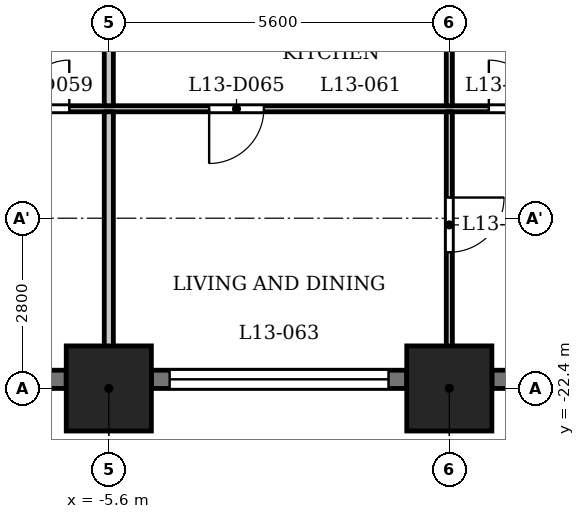
"""IFC4 building model, lengths in metres.
Left out: names, types, materials, properties, quantities, classifications, styles, units other than length and angle.
Written with IfcOpenShell. Run it as: python <this file> out.ifc"""

import sys

from ifc_helpers import new_model, si_unit, direction, frame, frame_2d, origin, origin_2d, place, context, subcontext, project, spatial, rectangle, extrude, element, fill, save


model = new_model("IFC4")
c1 = context("Model", 3, precision=1e-05, world=origin(), true_north=direction((0.0, 1.0)))
c2 = subcontext(c1, "Body", "Model", "MODEL_VIEW")
j1 = project(units=[si_unit("LENGTHUNIT", "METRE"), si_unit("PLANEANGLEUNIT", "RADIAN")], contexts=[c1])
p1 = place(None, origin())
s1 = spatial("IfcSite", under=j1, at=p1, CompositionType="ELEMENT")
p2 = place(p1, origin())
s2 = spatial("IfcBuilding", under=s1, at=p2, CompositionType="ELEMENT")
p3 = place(p2, frame((0.0, 0.0, 55.0)))
s3 = spatial("IfcBuildingStorey", under=s2, at=p3, CompositionType="ELEMENT", Elevation=55.0)
for number, where, z_axis, x_axis in (
    (1, (-5.6, -22.4, 0.0), (0.0, 0.0, 1.0), (1.0, 0.0, 0.0)),
    (2, (0.0, -22.4, 0.0), (0.0, 0.0, 1.0), (1.0, 0.0, 0.0)),
):
    element("IfcColumn", number, at=place(p3, frame(where, z_axis=z_axis, x_axis=x_axis)), inside=s3, PredefinedType="COLUMN", context=c2, shape_type="SweptSolid", body=[
        extrude(rectangle(XDim=1.4, YDim=1.4, at=origin_2d()), origin(), (0.0, 0.0, 1.0), 3.5),
    ])
p4 = place(p3, frame((-10.5, -22.25, 0.0), z_axis=(0.0, 0.0, 1.0), x_axis=(1.0, 0.0, 0.0)))
e3 = element("IfcWall", 3, at=p4, inside=s3, PredefinedType="SOLIDWALL", context=c2, shape_type="SweptSolid", body=[
    extrude(rectangle(XDim=4.2, YDim=0.3, at=frame_2d((2.1, 0.0))), origin(), (0.0, 0.0, 1.0), 2.35),
])
p5 = place(p4, frame((0.3, 0.0, 1.2)))
e4 = element("IfcOpeningElement", 4, at=p5, cuts=e3, PredefinedType="OPENING", context=c2, shape_type="SweptSolid", body=[
    extrude(rectangle(XDim=3.6, YDim=0.95, at=frame_2d((1.8, 0.475))), frame((0.0, 0.16, 0.0), z_axis=(0.0, -1.0, 0.0), x_axis=(1.0, 0.0, 0.0)), (0.0, 0.0, 1.0), 0.32),
])
p6 = place(p3, frame((-4.9, -22.25, 0.0), z_axis=(0.0, 0.0, 1.0), x_axis=(1.0, 0.0, 0.0)))
e5 = element("IfcWall", 5, at=p6, inside=s3, PredefinedType="SOLIDWALL", context=c2, shape_type="SweptSolid", body=[
    extrude(rectangle(XDim=4.2, YDim=0.3, at=frame_2d((2.1, 0.0))), origin(), (0.0, 0.0, 1.0), 2.35),
])
p7 = place(p6, frame((0.3, 0.0, 1.2)))
e6 = element("IfcOpeningElement", 6, at=p7, cuts=e5, PredefinedType="OPENING", context=c2, shape_type="SweptSolid", body=[
    extrude(rectangle(XDim=3.6, YDim=0.95, at=frame_2d((1.8, 0.475))), frame((0.0, 0.16, 0.0), z_axis=(0.0, -1.0, 0.0), x_axis=(1.0, 0.0, 0.0)), (0.0, 0.0, 1.0), 0.32),
])
p8 = place(p3, frame((0.7, -22.25, 0.0), z_axis=(0.0, 0.0, 1.0), x_axis=(1.0, 0.0, 0.0)))
e7 = element("IfcWall", 7, at=p8, inside=s3, PredefinedType="SOLIDWALL", context=c2, shape_type="SweptSolid", body=[
    extrude(rectangle(XDim=4.2, YDim=0.3, at=frame_2d((2.1, 0.0))), origin(), (0.0, 0.0, 1.0), 2.35),
])
p9 = place(p8, frame((0.3, 0.0, 1.2)))
e8 = element("IfcOpeningElement", 8, at=p9, cuts=e7, PredefinedType="OPENING", context=c2, shape_type="SweptSolid", body=[
    extrude(rectangle(XDim=3.6, YDim=0.95, at=frame_2d((1.8, 0.475))), frame((0.0, 0.16, 0.0), z_axis=(0.0, -1.0, 0.0), x_axis=(1.0, 0.0, 0.0)), (0.0, 0.0, 1.0), 0.32),
])
p10 = place(p3, frame((-26.394, -17.8, 0.0), z_axis=(0.0, 0.0, 1.0), x_axis=(1.0, 0.0, 0.0)))
e9 = element("IfcWall", 9, at=p10, inside=s3, PredefinedType="PARTITIONING", context=c2, shape_type="SweptSolid", body=[
    extrude(rectangle(XDim=53.034, YDim=0.1, at=frame_2d((26.517, 0.0))), origin(), (0.0, 0.0, 1.0), 3.2),
])
p11 = place(p10, frame((0.794, 0.0, 0.0)))
e10 = element("IfcOpeningElement", 10, at=p11, cuts=e9, PredefinedType="OPENING", context=c2, shape_type="SweptSolid", body=[
    extrude(rectangle(XDim=0.8, YDim=2.1, at=frame_2d((0.4, 1.05))), frame((0.0, 0.06, 0.0), z_axis=(0.0, -1.0, 0.0), x_axis=(1.0, 0.0, 0.0)), (0.0, 0.0, 1.0), 0.12),
])
p12 = place(p10, frame((5.644, 0.0, 0.0)))
e11 = element("IfcOpeningElement", 11, at=p12, cuts=e9, PredefinedType="OPENING", context=c2, shape_type="SweptSolid", body=[
    extrude(rectangle(XDim=0.9, YDim=2.1, at=frame_2d((0.45, 1.05))), frame((0.0, 0.06, 0.0), z_axis=(0.0, -1.0, 0.0), x_axis=(1.0, 0.0, 0.0)), (0.0, 0.0, 1.0), 0.12),
])
p13 = place(p10, frame((19.344, 0.0, 0.0)))
e12 = element("IfcOpeningElement", 12, at=p13, cuts=e9, PredefinedType="OPENING", context=c2, shape_type="SweptSolid", body=[
    extrude(rectangle(XDim=0.8, YDim=2.1, at=frame_2d((0.4, 1.05))), frame((0.0, 0.06, 0.0), z_axis=(0.0, -1.0, 0.0), x_axis=(1.0, 0.0, 0.0)), (0.0, 0.0, 1.0), 0.12),
])
p14 = place(p10, frame((17.094, 0.0, 0.0)))
e13 = element("IfcOpeningElement", 13, at=p14, cuts=e9, PredefinedType="OPENING", context=c2, shape_type="SweptSolid", body=[
    extrude(rectangle(XDim=0.9, YDim=2.1, at=frame_2d((0.45, 1.05))), frame((0.0, 0.06, 0.0), z_axis=(0.0, -1.0, 0.0), x_axis=(1.0, 0.0, 0.0)), (0.0, 0.0, 1.0), 0.12),
])
p15 = place(p10, frame((10.494, 0.0, 0.0)))
e14 = element("IfcOpeningElement", 14, at=p15, cuts=e9, PredefinedType="OPENING", context=c2, shape_type="SweptSolid", body=[
    extrude(rectangle(XDim=0.9, YDim=2.1, at=frame_2d((0.45, 1.05))), frame((0.0, 0.06, 0.0), z_axis=(0.0, -1.0, 0.0), x_axis=(1.0, 0.0, 0.0)), (0.0, 0.0, 1.0), 0.12),
])
p16 = place(p10, frame((13.294, 0.0, 0.0)))
e15 = element("IfcOpeningElement", 15, at=p16, cuts=e9, PredefinedType="OPENING", context=c2, shape_type="SweptSolid", body=[
    extrude(rectangle(XDim=0.9, YDim=2.1, at=frame_2d((0.45, 1.05))), frame((0.0, 0.06, 0.0), z_axis=(0.0, -1.0, 0.0), x_axis=(1.0, 0.0, 0.0)), (0.0, 0.0, 1.0), 0.12),
])
p17 = place(p10, frame((27.044, 0.0, 0.0)))
e16 = element("IfcOpeningElement", 16, at=p17, cuts=e9, PredefinedType="OPENING", context=c2, shape_type="SweptSolid", body=[
    extrude(rectangle(XDim=0.8, YDim=2.1, at=frame_2d((0.4, 1.05))), frame((0.0, 0.06, 0.0), z_axis=(0.0, -1.0, 0.0), x_axis=(1.0, 0.0, 0.0)), (0.0, 0.0, 1.0), 0.12),
])
p18 = place(p10, frame((22.444, 0.0, 0.0)))
e17 = element("IfcOpeningElement", 17, at=p18, cuts=e9, PredefinedType="OPENING", context=c2, shape_type="SweptSolid", body=[
    extrude(rectangle(XDim=0.9, YDim=2.1, at=frame_2d((0.45, 1.05))), frame((0.0, 0.06, 0.0), z_axis=(0.0, -1.0, 0.0), x_axis=(1.0, 0.0, 0.0)), (0.0, 0.0, 1.0), 0.12),
])
p19 = place(p10, frame((36.144, 0.0, 0.0)))
e18 = element("IfcOpeningElement", 18, at=p19, cuts=e9, PredefinedType="OPENING", context=c2, shape_type="SweptSolid", body=[
    extrude(rectangle(XDim=0.8, YDim=2.1, at=frame_2d((0.4, 1.05))), frame((0.0, 0.06, 0.0), z_axis=(0.0, -1.0, 0.0), x_axis=(1.0, 0.0, 0.0)), (0.0, 0.0, 1.0), 0.12),
])
p20 = place(p10, frame((33.644, 0.0, 0.0)))
e19 = element("IfcOpeningElement", 19, at=p20, cuts=e9, PredefinedType="OPENING", context=c2, shape_type="SweptSolid", body=[
    extrude(rectangle(XDim=0.9, YDim=2.1, at=frame_2d((0.45, 1.05))), frame((0.0, 0.06, 0.0), z_axis=(0.0, -1.0, 0.0), x_axis=(1.0, 0.0, 0.0)), (0.0, 0.0, 1.0), 0.12),
])
p21 = place(p10, frame((39.144, 0.0, 0.0)))
e20 = element("IfcOpeningElement", 20, at=p21, cuts=e9, PredefinedType="OPENING", context=c2, shape_type="SweptSolid", body=[
    extrude(rectangle(XDim=0.8, YDim=2.1, at=frame_2d((0.4, 1.05))), frame((0.0, 0.06, 0.0), z_axis=(0.0, -1.0, 0.0), x_axis=(1.0, 0.0, 0.0)), (0.0, 0.0, 1.0), 0.12),
])
p22 = place(p10, frame((41.494, 0.0, 0.0)))
e21 = element("IfcOpeningElement", 21, at=p22, cuts=e9, PredefinedType="OPENING", context=c2, shape_type="SweptSolid", body=[
    extrude(rectangle(XDim=0.9, YDim=2.1, at=frame_2d((0.45, 1.05))), frame((0.0, 0.06, 0.0), z_axis=(0.0, -1.0, 0.0), x_axis=(1.0, 0.0, 0.0)), (0.0, 0.0, 1.0), 0.12),
])
p23 = place(p10, frame((49.362, 0.0, 0.0)))
e22 = element("IfcOpeningElement", 22, at=p23, cuts=e9, PredefinedType="OPENING", context=c2, shape_type="SweptSolid", body=[
    extrude(rectangle(XDim=0.8, YDim=2.1, at=frame_2d((0.4, 1.05))), frame((0.0, 0.06, 0.0), z_axis=(0.0, -1.0, 0.0), x_axis=(1.0, 0.0, 0.0)), (0.0, 0.0, 1.0), 0.12),
])
p24 = place(p10, frame((45.094, 0.0, 0.0)))
e23 = element("IfcOpeningElement", 23, at=p24, cuts=e9, PredefinedType="OPENING", context=c2, shape_type="SweptSolid", body=[
    extrude(rectangle(XDim=0.9, YDim=2.1, at=frame_2d((0.45, 1.05))), frame((0.0, 0.06, 0.0), z_axis=(0.0, -1.0, 0.0), x_axis=(1.0, 0.0, 0.0)), (0.0, 0.0, 1.0), 0.12),
])
p25 = place(p3, frame((-5.6, -23.08, 0.0), z_axis=(0.0, 0.0, 1.0), x_axis=(0.0, 1.0, 0.0)))
e24 = element("IfcWall", 24, at=p25, inside=s3, PredefinedType="PARTITIONING", context=c2, shape_type="SweptSolid", body=[
    extrude(rectangle(XDim=5.23, YDim=0.15, at=frame_2d((2.615, 0.0))), origin(), (0.0, 0.0, 1.0), 3.2),
])
p26 = place(p3, frame((-5.6, -17.75, 0.0), z_axis=(0.0, 0.0, 1.0), x_axis=(0.0, 1.0, 0.0)))
e25 = element("IfcWall", 25, at=p26, inside=s3, PredefinedType="PARTITIONING", context=c2, shape_type="SweptSolid", body=[
    extrude(rectangle(XDim=2.275, YDim=0.15, at=frame_2d((1.137, 0.0))), origin(), (0.0, 0.0, 1.0), 3.2),
])
p27 = place(p3, frame((0.0, -23.08, 0.0), z_axis=(0.0, 0.0, 1.0), x_axis=(0.0, 1.0, 0.0)))
e26 = element("IfcWall", 26, at=p27, inside=s3, PredefinedType="PARTITIONING", context=c2, shape_type="SweptSolid", body=[
    extrude(rectangle(XDim=5.23, YDim=0.1, at=frame_2d((2.615, 0.0))), origin(), (0.0, 0.0, 1.0), 3.2),
])
p28 = place(p27, frame((2.92, 0.0, 0.0)))
e27 = element("IfcOpeningElement", 27, at=p28, cuts=e26, PredefinedType="OPENING", context=c2, shape_type="SweptSolid", body=[
    extrude(rectangle(XDim=0.9, YDim=2.1, at=frame_2d((0.45, 1.05))), frame((0.0, 0.06, 0.0), z_axis=(0.0, -1.0, 0.0), x_axis=(1.0, 0.0, 0.0)), (0.0, 0.0, 1.0), 0.12),
])
p29 = place(p3, frame((0.0, -17.75, 0.0), z_axis=(0.0, 0.0, 1.0), x_axis=(0.0, 1.0, 0.0)))
e28 = element("IfcWall", 28, at=p29, inside=s3, PredefinedType="PARTITIONING", context=c2, shape_type="SweptSolid", body=[
    extrude(rectangle(XDim=2.275, YDim=0.1, at=frame_2d((1.137, 0.0))), origin(), (0.0, 0.0, 1.0), 3.2),
])
p30 = place(p13, origin())
e29 = element("IfcDoor", 29, at=p30, inside=s3, OperationType="SINGLE_SWING_LEFT", PredefinedType="DOOR", context=c2, shape_type="SweptSolid", body=[
    extrude(rectangle(XDim=0.8, YDim=2.1, at=frame_2d((0.4, 1.05))), frame((0.0, 0.025, 0.0), z_axis=(0.0, -1.0, 0.0), x_axis=(1.0, 0.0, 0.0)), (0.0, 0.0, 1.0), 0.05),
])
fill(e12, e29)
p31 = place(p17, origin())
e30 = element("IfcDoor", 30, at=p31, inside=s3, OperationType="SINGLE_SWING_RIGHT", PredefinedType="DOOR", context=c2, shape_type="SweptSolid", body=[
    extrude(rectangle(XDim=0.8, YDim=2.1, at=frame_2d((0.4, 1.05))), frame((0.0, 0.025, 0.0), z_axis=(0.0, -1.0, 0.0), x_axis=(1.0, 0.0, 0.0)), (0.0, 0.0, 1.0), 0.05),
])
fill(e16, e30)
p32 = place(p18, origin())
e31 = element("IfcDoor", 31, at=p32, inside=s3, OperationType="SINGLE_SWING_LEFT", PredefinedType="DOOR", context=c2, shape_type="SweptSolid", body=[
    extrude(rectangle(XDim=0.9, YDim=2.1, at=frame_2d((0.45, 1.05))), frame((0.0, 0.025, 0.0), z_axis=(0.0, -1.0, 0.0), x_axis=(1.0, 0.0, 0.0)), (0.0, 0.0, 1.0), 0.05),
])
fill(e17, e31)
p33 = place(p28, origin())
e32 = element("IfcDoor", 32, at=p33, inside=s3, OperationType="SINGLE_SWING_RIGHT", PredefinedType="DOOR", context=c2, shape_type="SweptSolid", body=[
    extrude(rectangle(XDim=0.9, YDim=2.1, at=frame_2d((0.45, 1.05))), frame((0.0, 0.025, 0.0), z_axis=(0.0, -1.0, 0.0), x_axis=(1.0, 0.0, 0.0)), (0.0, 0.0, 1.0), 0.05),
])
fill(e27, e32)
p34 = place(p7, origin())
e33 = element("IfcWindow", 33, at=p34, inside=s3, PartitioningType="SINGLE_PANEL", PredefinedType="WINDOW", context=c2, shape_type="SweptSolid", body=[
    extrude(rectangle(XDim=3.6, YDim=0.95, at=frame_2d((1.8, 0.475))), frame((0.0, 0.03, 0.0), z_axis=(0.0, -1.0, 0.0), x_axis=(1.0, 0.0, 0.0)), (0.0, 0.0, 1.0), 0.06),
])
fill(e6, e33)
save(model, sys.argv[1])
